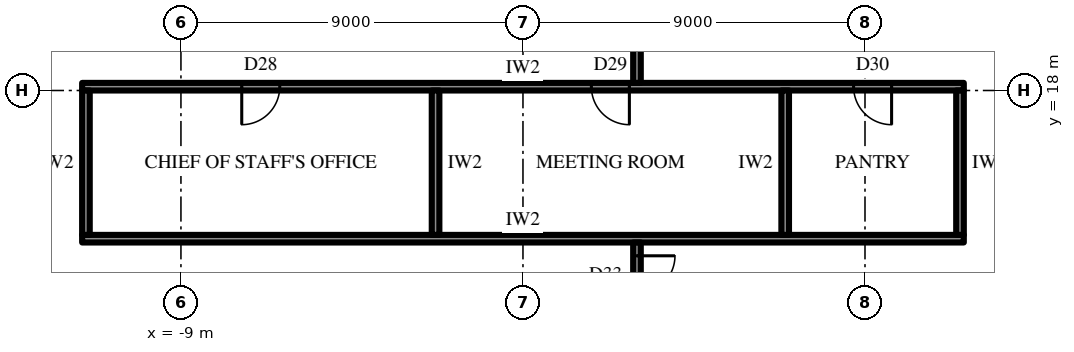
"""IFC4 building model, lengths in metres.
Left out: names, types, materials, properties, quantities, classifications, styles, units other than length and angle.
Written with IfcOpenShell. Run it as: python <this file> out.ifc"""

import sys

from ifc_helpers import new_model, si_unit, direction, frame, frame_2d, origin, place, context, subcontext, project, spatial, rectangle, extrude, element, fill, save


model = new_model("IFC4")
c1 = context("Model", 3, precision=1e-05, world=origin(), true_north=direction((0.0, 1.0)))
c2 = subcontext(c1, "Body", "Model", "MODEL_VIEW")
j1 = project(units=[si_unit("LENGTHUNIT", "METRE"), si_unit("PLANEANGLEUNIT", "RADIAN")], contexts=[c1])
p1 = place(None, origin())
s1 = spatial("IfcSite", under=j1, at=p1, CompositionType="ELEMENT")
p2 = place(p1, origin())
s2 = spatial("IfcBuilding", under=s1, at=p2, CompositionType="ELEMENT")
p3 = place(p2, frame((0.0, 0.0, 370.3)))
s3 = spatial("IfcBuildingStorey", under=s2, at=p3, CompositionType="ELEMENT", Elevation=370.3)
p4 = place(p3, frame((-11.6, 14.1, 0.0), z_axis=(0.0, 0.0, 1.0), x_axis=(1.0, 0.0, 0.0)))
e1 = element("IfcWall", 1, at=p4, inside=s3, PredefinedType="PARTITIONING", context=c2, shape_type="SweptSolid", body=[
    extrude(rectangle(XDim=23.2, YDim=0.2, at=frame_2d((11.6, 0.0))), origin(), (0.0, 0.0, 1.0), 4.0),
])
p5 = place(p3, frame((-11.6, 18.1, 0.0), z_axis=(0.0, 0.0, 1.0), x_axis=(1.0, 0.0, 0.0)))
e2 = element("IfcWall", 2, at=p5, inside=s3, PredefinedType="PARTITIONING", context=c2, shape_type="SweptSolid", body=[
    extrude(rectangle(XDim=23.2, YDim=0.2, at=frame_2d((11.6, 0.0))), origin(), (0.0, 0.0, 1.0), 4.0),
])
p6 = place(p5, frame((4.2, 0.0, 0.0)))
e3 = element("IfcOpeningElement", 3, at=p6, cuts=e2, PredefinedType="OPENING", context=c2, shape_type="SweptSolid", body=[
    extrude(rectangle(XDim=1.0, YDim=2.2, at=frame_2d((0.5, 1.1))), frame((0.0, 0.11, 0.0), z_axis=(0.0, -1.0, 0.0), x_axis=(1.0, 0.0, 0.0)), (0.0, 0.0, 1.0), 0.22),
])
p7 = place(p5, frame((13.4, 0.0, 0.0)))
e4 = element("IfcOpeningElement", 4, at=p7, cuts=e2, PredefinedType="OPENING", context=c2, shape_type="SweptSolid", body=[
    extrude(rectangle(XDim=1.0, YDim=2.2, at=frame_2d((0.5, 1.1))), frame((0.0, 0.11, 0.0), z_axis=(0.0, -1.0, 0.0), x_axis=(1.0, 0.0, 0.0)), (0.0, 0.0, 1.0), 0.22),
])
p8 = place(p5, frame((20.3, 0.0, 0.0)))
e5 = element("IfcOpeningElement", 5, at=p8, cuts=e2, PredefinedType="OPENING", context=c2, shape_type="SweptSolid", body=[
    extrude(rectangle(XDim=1.0, YDim=2.2, at=frame_2d((0.5, 1.1))), frame((0.0, 0.11, 0.0), z_axis=(0.0, -1.0, 0.0), x_axis=(1.0, 0.0, 0.0)), (0.0, 0.0, 1.0), 0.22),
])
for number, where, z_axis, x_axis in (
    (6, (-11.5, 14.2, 0.0), (0.0, 0.0, 1.0), (0.0, 1.0, 0.0)),
    (7, (-2.3, 14.2, 0.0), (0.0, 0.0, 1.0), (0.0, 1.0, 0.0)),
    (8, (6.9, 14.2, 0.0), (0.0, 0.0, 1.0), (0.0, 1.0, 0.0)),
    (9, (11.5, 14.2, 0.0), (0.0, 0.0, 1.0), (0.0, 1.0, 0.0)),
):
    element("IfcWall", number, at=place(p3, frame(where, z_axis=z_axis, x_axis=x_axis)), inside=s3, PredefinedType="PARTITIONING", context=c2, shape_type="SweptSolid", body=[
        extrude(rectangle(XDim=3.8, YDim=0.2, at=frame_2d((1.9, 0.0))), origin(), (0.0, 0.0, 1.0), 4.0),
    ])
p9 = place(p3, frame((3.0, 12.3, 0.0), z_axis=(0.0, 0.0, 1.0), x_axis=(0.0, 1.0, 0.0)))
e10 = element("IfcWall", 10, at=p9, inside=s3, PredefinedType="PARTITIONING", context=c2, shape_type="SweptSolid", body=[
    extrude(rectangle(XDim=1.7, YDim=0.2, at=frame_2d((0.85, 0.0))), origin(), (0.0, 0.0, 1.0), 4.0),
])
p10 = place(p9, frame((0.35, 0.0, 0.0)))
e11 = element("IfcOpeningElement", 11, at=p10, cuts=e10, PredefinedType="OPENING", context=c2, shape_type="SweptSolid", body=[
    extrude(rectangle(XDim=1.0, YDim=2.2, at=frame_2d((0.5, 1.1))), frame((0.0, 0.11, 0.0), z_axis=(0.0, -1.0, 0.0), x_axis=(1.0, 0.0, 0.0)), (0.0, 0.0, 1.0), 0.22),
])
p11 = place(p3, frame((3.0, 18.2, 0.0), z_axis=(0.0, 0.0, 1.0), x_axis=(0.0, 1.0, 0.0)))
e12 = element("IfcWall", 12, at=p11, inside=s3, PredefinedType="PARTITIONING", context=c2, shape_type="SweptSolid", body=[
    extrude(rectangle(XDim=3.45, YDim=0.2, at=frame_2d((1.725, 0.0))), origin(), (0.0, 0.0, 1.0), 4.0),
])
p12 = place(p6, frame((1.0, 0.0, 0.0), z_axis=(0.0, 0.0, 1.0), x_axis=(-1.0, 0.0, 0.0)))
e13 = element("IfcDoor", 13, at=p12, inside=s3, OperationType="SINGLE_SWING_LEFT", PredefinedType="DOOR", context=c2, shape_type="SweptSolid", body=[
    extrude(rectangle(XDim=1.0, YDim=2.2, at=frame_2d((0.5, 1.1))), frame((0.0, 0.025, 0.0), z_axis=(0.0, -1.0, 0.0), x_axis=(1.0, 0.0, 0.0)), (0.0, 0.0, 1.0), 0.05),
])
fill(e3, e13)
p13 = place(p7, frame((1.0, 0.0, 0.0), z_axis=(0.0, 0.0, 1.0), x_axis=(-1.0, 0.0, 0.0)))
e14 = element("IfcDoor", 14, at=p13, inside=s3, OperationType="SINGLE_SWING_RIGHT", PredefinedType="DOOR", context=c2, shape_type="SweptSolid", body=[
    extrude(rectangle(XDim=1.0, YDim=2.2, at=frame_2d((0.5, 1.1))), frame((0.0, 0.025, 0.0), z_axis=(0.0, -1.0, 0.0), x_axis=(1.0, 0.0, 0.0)), (0.0, 0.0, 1.0), 0.05),
])
fill(e4, e14)
p14 = place(p8, frame((1.0, 0.0, 0.0), z_axis=(0.0, 0.0, 1.0), x_axis=(-1.0, 0.0, 0.0)))
e15 = element("IfcDoor", 15, at=p14, inside=s3, OperationType="SINGLE_SWING_RIGHT", PredefinedType="DOOR", context=c2, shape_type="SweptSolid", body=[
    extrude(rectangle(XDim=1.0, YDim=2.2, at=frame_2d((0.5, 1.1))), frame((0.0, 0.025, 0.0), z_axis=(0.0, -1.0, 0.0), x_axis=(1.0, 0.0, 0.0)), (0.0, 0.0, 1.0), 0.05),
])
fill(e5, e15)
p15 = place(p10, frame((1.0, 0.0, 0.0), z_axis=(0.0, 0.0, 1.0), x_axis=(-1.0, 0.0, 0.0)))
e16 = element("IfcDoor", 16, at=p15, inside=s3, OperationType="SINGLE_SWING_RIGHT", PredefinedType="DOOR", context=c2, shape_type="SweptSolid", body=[
    extrude(rectangle(XDim=1.0, YDim=2.2, at=frame_2d((0.5, 1.1))), frame((0.0, 0.025, 0.0), z_axis=(0.0, -1.0, 0.0), x_axis=(1.0, 0.0, 0.0)), (0.0, 0.0, 1.0), 0.05),
])
fill(e11, e16)
save(model, sys.argv[1])
